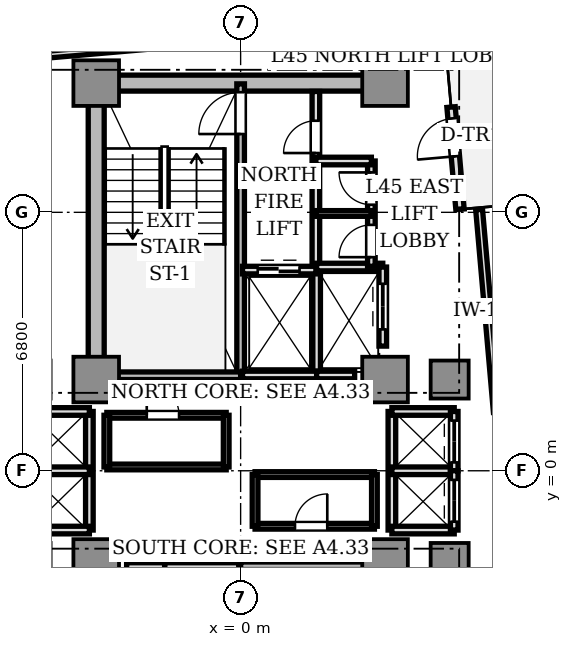
"""IFC4 building model, lengths in metres.
Left out: names, types, materials, properties, quantities, classifications, styles, units other than length and angle.
Written with IfcOpenShell. Run it as: python <this file> out.ifc"""

import sys

from ifc_helpers import new_model, si_unit, direction, frame, frame_2d, origin, origin_2d, place, context, subcontext, project, spatial, rectangle, extrude, source, transform, mapped, element, fill, save


model = new_model("IFC4")
c1 = context("Model", 3, precision=1e-05, world=origin(), true_north=direction((0.0, 1.0)))
c2 = subcontext(c1, "Body", "Model", "MODEL_VIEW")
j1 = project(units=[si_unit("LENGTHUNIT", "METRE"), si_unit("PLANEANGLEUNIT", "RADIAN")], contexts=[c1])
p1 = place(None, origin())
s1 = spatial("IfcSite", under=j1, at=p1, CompositionType="ELEMENT")
p2 = place(p1, origin())
s2 = spatial("IfcBuilding", under=s1, at=p2, CompositionType="ELEMENT")
p3 = place(p2, frame((0.0, 0.0, 164.0)))
s3 = spatial("IfcBuildingStorey", under=s2, at=p3, CompositionType="ELEMENT", Elevation=164.0)
p4 = place(p3, frame((-3.55, 10.2, 0.0), z_axis=(0.0, 0.0, 1.0), x_axis=(1.0, 0.0, 0.0)))
e1 = element("IfcWall", 1, at=p4, inside=s3, PredefinedType="SHEAR", context=c2, shape_type="SweptSolid", body=[
    extrude(rectangle(XDim=7.1, YDim=0.42, at=frame_2d((3.55, 0.0))), origin(), (0.0, 0.0, 1.0), 3.11),
])
p5 = place(p3, frame((-3.8, 2.85, 0.0), z_axis=(0.0, 0.0, 1.0), x_axis=(0.0, 1.0, 0.0)))
e2 = element("IfcWall", 2, at=p5, inside=s3, PredefinedType="SHEAR", context=c2, shape_type="SweptSolid", body=[
    extrude(rectangle(XDim=6.9, YDim=0.42, at=frame_2d((3.45, 0.0))), origin(), (0.0, 0.0, 1.0), 3.11),
])
m1 = source(origin(), c2, "Body", "SweptSolid", [
    extrude(rectangle(XDim=1.2, YDim=1.2, at=origin_2d()), origin(), (0.0, 0.0, 1.0), 3.11),
])
for number, where, z_axis, x_axis in (
    (3, (-3.8, 2.4, 0.0), (0.0, 0.0, 1.0), (1.0, 0.0, 0.0)),
    (4, (3.8, 2.4, 0.0), (0.0, 0.0, 1.0), (1.0, 0.0, 0.0)),
    (5, (-3.8, 10.2, 0.0), (0.0, 0.0, 1.0), (1.0, 0.0, 0.0)),
    (6, (3.8, 10.2, 0.0), (0.0, 0.0, 1.0), (1.0, 0.0, 0.0)),
    (7, (-3.8, -2.4, 0.0), (0.0, 0.0, 1.0), (1.0, 0.0, 0.0)),
    (8, (3.8, -2.4, 0.0), (0.0, 0.0, 1.0), (1.0, 0.0, 0.0)),
):
    element("IfcColumn", number, at=place(p3, frame(where, z_axis=z_axis, x_axis=x_axis)), inside=s3, PredefinedType="COLUMN", context=c2, shape_type="MappedRepresentation", body=[
        mapped(m1, transform((0.0, 0.0, 0.0), scale=1.0)),
    ])
m2 = source(origin(), c2, "Body", "SweptSolid", [
    extrude(rectangle(XDim=1.0, YDim=1.0, at=origin_2d()), origin(), (0.0, 0.0, 1.0), 3.11),
])
for number, where, z_axis, x_axis in (
    (9, (5.5, 2.4, 0.0), (0.0, 0.0, 1.0), (1.0, 0.0, 0.0)),
    (10, (5.5, -2.4, 0.0), (0.0, 0.0, 1.0), (1.0, 0.0, 0.0)),
):
    element("IfcColumn", number, at=place(p3, frame(where, z_axis=z_axis, x_axis=x_axis)), inside=s3, PredefinedType="COLUMN", context=c2, shape_type="MappedRepresentation", body=[
        mapped(m2, transform((0.0, 0.0, 0.0), scale=1.0)),
    ])
p6 = place(p3, frame((5.772, 6.879, 0.0), z_axis=(0.0, 0.0, 1.0), x_axis=(-0.087168071984, 0.996193619346, 0.0)))
e11 = element("IfcWall", 11, at=p6, inside=s3, PredefinedType="STANDARD", context=c2, shape_type="SweptSolid", body=[
    extrude(rectangle(XDim=2.7, YDim=0.22, at=frame_2d((1.35, 0.0))), origin(), (0.0, 0.0, 1.0), 3.11),
])
p7 = place(p6, frame((1.4, 0.0, 0.0)))
e12 = element("IfcOpeningElement", 12, at=p7, cuts=e11, PredefinedType="OPENING", context=c2, shape_type="SweptSolid", body=[
    extrude(rectangle(XDim=1.0, YDim=2.2, at=frame_2d((0.5, 1.1))), frame((0.0, 0.12, 0.0), z_axis=(0.0, -1.0, 0.0), x_axis=(1.0, 0.0, 0.0)), (0.0, 0.0, 1.0), 0.24),
])
p8 = place(p3, frame((0.0, 2.5, 0.0), z_axis=(0.0, 0.0, 1.0), x_axis=(0.0, 1.0, 0.0)))
e13 = element("IfcWall", 13, at=p8, inside=s3, PredefinedType="SOLIDWALL", context=c2, shape_type="SweptSolid", body=[
    extrude(rectangle(XDim=7.68, YDim=0.2, at=frame_2d((3.84, 0.0))), origin(), (0.0, 0.0, 1.0), 3.11),
])
p9 = place(p8, frame((6.36, 0.0, 0.0)))
e14 = element("IfcOpeningElement", 14, at=p9, cuts=e13, PredefinedType="OPENING", context=c2, shape_type="SweptSolid", body=[
    extrude(rectangle(XDim=1.1, YDim=2.15, at=frame_2d((0.55, 1.075))), frame((0.0, 0.11, 0.0), z_axis=(0.0, -1.0, 0.0), x_axis=(1.0, 0.0, 0.0)), (0.0, 0.0, 1.0), 0.22),
])
p10 = place(p3, frame((-3.72, 2.5, 0.0), z_axis=(0.0, 0.0, 1.0), x_axis=(1.0, 0.0, 0.0)))
e15 = element("IfcWall", 15, at=p10, inside=s3, PredefinedType="SOLIDWALL", context=c2, shape_type="SweptSolid", body=[
    extrude(rectangle(XDim=3.72, YDim=0.2, at=frame_2d((1.86, 0.0))), origin(), (0.0, 0.0, 1.0), 3.11),
])
p11 = place(p3, frame((0.0, -10.18, 0.0), z_axis=(0.0, 0.0, 1.0), x_axis=(0.0, 1.0, 0.0)))
e16 = element("IfcWall", 16, at=p11, inside=s3, PredefinedType="SOLIDWALL", context=c2, shape_type="SweptSolid", body=[
    extrude(rectangle(XDim=7.68, YDim=0.2, at=frame_2d((3.84, 0.0))), origin(), (0.0, 0.0, 1.0), 3.11),
])
p12 = place(p11, frame((0.28, 0.0, 0.0)))
e17 = element("IfcOpeningElement", 17, at=p12, cuts=e16, PredefinedType="OPENING", context=c2, shape_type="SweptSolid", body=[
    extrude(rectangle(XDim=1.1, YDim=2.15, at=frame_2d((0.55, 1.075))), frame((0.0, 0.11, 0.0), z_axis=(0.0, -1.0, 0.0), x_axis=(1.0, 0.0, 0.0)), (0.0, 0.0, 1.0), 0.22),
])
p13 = place(p3, frame((0.0, -2.5, 0.0), z_axis=(0.0, 0.0, 1.0), x_axis=(1.0, 0.0, 0.0)))
e18 = element("IfcWall", 18, at=p13, inside=s3, PredefinedType="SOLIDWALL", context=c2, shape_type="SweptSolid", body=[
    extrude(rectangle(XDim=3.72, YDim=0.2, at=frame_2d((1.86, 0.0))), origin(), (0.0, 0.0, 1.0), 3.11),
])
p14 = place(p3, frame((1.98, 5.32, 0.0), z_axis=(0.0, 0.0, 1.0), x_axis=(0.0, 1.0, 0.0)))
e19 = element("IfcWall", 19, at=p14, inside=s3, PredefinedType="SOLIDWALL", context=c2, shape_type="SweptSolid", body=[
    extrude(rectangle(XDim=4.66, YDim=0.2, at=frame_2d((2.33, 0.0))), origin(), (0.0, 0.0, 1.0), 2.66),
])
p15 = place(p14, frame((3.04, 0.0, 0.0)))
e20 = element("IfcOpeningElement", 20, at=p15, cuts=e19, PredefinedType="OPENING", context=c2, shape_type="SweptSolid", body=[
    extrude(rectangle(XDim=0.85, YDim=2.1, at=frame_2d((0.425, 1.05))), frame((0.0, 0.11, 0.0), z_axis=(0.0, -1.0, 0.0), x_axis=(1.0, 0.0, 0.0)), (0.0, 0.0, 1.0), 0.22),
])
p16 = place(p3, frame((2.0, 2.5, 0.0), z_axis=(0.0, 0.0, 1.0), x_axis=(0.0, 1.0, 0.0)))
e21 = element("IfcWall", 21, at=p16, inside=s3, PredefinedType="SOLIDWALL", context=c2, shape_type="SweptSolid", body=[
    extrude(rectangle(XDim=2.78, YDim=0.2, at=frame_2d((1.39, 0.0))), origin(), (0.0, 0.0, 1.0), 2.66),
])
p17 = place(p3, frame((0.05, 2.52, 0.0), z_axis=(0.0, 0.0, 1.0), x_axis=(1.0, 0.0, 0.0)))
e22 = element("IfcWall", 22, at=p17, inside=s3, PredefinedType="SOLIDWALL", context=c2, shape_type="SweptSolid", body=[
    extrude(rectangle(XDim=1.95, YDim=0.2, at=frame_2d((0.975, 0.0))), origin(), (0.0, 0.0, 1.0), 2.66),
])
p18 = place(p3, frame((0.05, 5.28, 0.0), z_axis=(0.0, 0.0, 1.0), x_axis=(1.0, 0.0, 0.0)))
e23 = element("IfcWall", 23, at=p18, inside=s3, PredefinedType="SOLIDWALL", context=c2, shape_type="SweptSolid", body=[
    extrude(rectangle(XDim=1.93, YDim=0.2, at=frame_2d((0.965, 0.0))), origin(), (0.0, 0.0, 1.0), 2.66),
])
p19 = place(p18, frame((0.4, 0.0, 0.0)))
e24 = element("IfcOpeningElement", 24, at=p19, cuts=e23, PredefinedType="OPENING", context=c2, shape_type="SweptSolid", body=[
    extrude(rectangle(XDim=1.1, YDim=2.2, at=frame_2d((0.55, 1.1))), frame((0.0, 0.11, 0.0), z_axis=(0.0, -1.0, 0.0), x_axis=(1.0, 0.0, 0.0)), (0.0, 0.0, 1.0), 0.22),
])
p20 = place(p3, frame((-2.0, -5.28, 0.0), z_axis=(0.0, 0.0, 1.0), x_axis=(0.0, 1.0, 0.0)))
e25 = element("IfcWall", 25, at=p20, inside=s3, PredefinedType="SOLIDWALL", context=c2, shape_type="SweptSolid", body=[
    extrude(rectangle(XDim=2.78, YDim=0.2, at=frame_2d((1.39, 0.0))), origin(), (0.0, 0.0, 1.0), 2.66),
])
p21 = place(p3, frame((-2.0, -2.52, 0.0), z_axis=(0.0, 0.0, 1.0), x_axis=(1.0, 0.0, 0.0)))
e26 = element("IfcWall", 26, at=p21, inside=s3, PredefinedType="SOLIDWALL", context=c2, shape_type="SweptSolid", body=[
    extrude(rectangle(XDim=1.95, YDim=0.2, at=frame_2d((0.975, 0.0))), origin(), (0.0, 0.0, 1.0), 2.66),
])
p22 = place(p3, frame((2.0, 2.52, 0.0), z_axis=(0.0, 0.0, 1.0), x_axis=(1.0, 0.0, 0.0)))
e27 = element("IfcWall", 27, at=p22, inside=s3, PredefinedType="SOLIDWALL", context=c2, shape_type="SweptSolid", body=[
    extrude(rectangle(XDim=1.0, YDim=0.2, at=frame_2d((0.5, 0.0))), origin(), (0.0, 0.0, 1.0), 2.66),
])
p23 = place(p3, frame((2.0, 5.36, 0.0), z_axis=(0.0, 0.0, 1.0), x_axis=(1.0, 0.0, 0.0)))
e28 = element("IfcWall", 28, at=p23, inside=s3, PredefinedType="SOLIDWALL", context=c2, shape_type="SweptSolid", body=[
    extrude(rectangle(XDim=1.74, YDim=0.2, at=frame_2d((0.87, 0.0))), origin(), (0.0, 0.0, 1.0), 2.66),
])
p24 = place(p3, frame((3.74, 3.28, 0.0), z_axis=(0.0, 0.0, 1.0), x_axis=(0.0, 1.0, 0.0)))
e29 = element("IfcWall", 29, at=p24, inside=s3, PredefinedType="SOLIDWALL", context=c2, shape_type="SweptSolid", body=[
    extrude(rectangle(XDim=2.08, YDim=0.2, at=frame_2d((1.04, 0.0))), origin(), (0.0, 0.0, 1.0), 2.66),
])
p25 = place(p24, frame((0.44, 0.0, 0.0)))
e30 = element("IfcOpeningElement", 30, at=p25, cuts=e29, PredefinedType="OPENING", context=c2, shape_type="SweptSolid", body=[
    extrude(rectangle(XDim=1.2, YDim=2.2, at=frame_2d((0.6, 1.1))), frame((0.0, 0.11, 0.0), z_axis=(0.0, -1.0, 0.0), x_axis=(1.0, 0.0, 0.0)), (0.0, 0.0, 1.0), 0.22),
])
p26 = place(p3, frame((-3.0, -2.52, 0.0), z_axis=(0.0, 0.0, 1.0), x_axis=(1.0, 0.0, 0.0)))
e31 = element("IfcWall", 31, at=p26, inside=s3, PredefinedType="SOLIDWALL", context=c2, shape_type="SweptSolid", body=[
    extrude(rectangle(XDim=1.0, YDim=0.2, at=frame_2d((0.5, 0.0))), origin(), (0.0, 0.0, 1.0), 2.66),
])
p27 = place(p3, frame((3.98, -1.56, 0.0), z_axis=(0.0, 0.0, 1.0), x_axis=(0.0, 1.0, 0.0)))
e32 = element("IfcWall", 32, at=p27, inside=s3, PredefinedType="SOLIDWALL", context=c2, shape_type="SweptSolid", body=[
    extrude(rectangle(XDim=3.12, YDim=0.2, at=frame_2d((1.56, 0.0))), origin(), (0.0, 0.0, 1.0), 2.28),
])
for number, where, z_axis, x_axis in (
    (33, (3.98, 1.56, 0.0), (0.0, 0.0, 1.0), (1.0, 0.0, 0.0)),
    (34, (3.98, -1.56, 0.0), (0.0, 0.0, 1.0), (1.0, 0.0, 0.0)),
    (35, (3.98, 0.0, 0.0), (0.0, 0.0, 1.0), (1.0, 0.0, 0.0)),
):
    element("IfcWall", number, at=place(p3, frame(where, z_axis=z_axis, x_axis=x_axis)), inside=s3, PredefinedType="SOLIDWALL", context=c2, shape_type="SweptSolid", body=[
        extrude(rectangle(XDim=1.64, YDim=0.2, at=frame_2d((0.82, 0.0))), origin(), (0.0, 0.0, 1.0), 2.66),
    ])
p28 = place(p3, frame((5.62, 0.0, 0.0), z_axis=(0.0, 0.0, 1.0), x_axis=(0.0, 1.0, 0.0)))
e36 = element("IfcWall", 36, at=p28, inside=s3, PredefinedType="SOLIDWALL", context=c2, shape_type="SweptSolid", body=[
    extrude(rectangle(XDim=1.56, YDim=0.2, at=frame_2d((0.78, 0.0))), origin(), (0.0, 0.0, 1.0), 2.66),
])
p29 = place(p28, frame((0.22, 0.0, 0.0)))
e37 = element("IfcOpeningElement", 37, at=p29, cuts=e36, PredefinedType="OPENING", context=c2, shape_type="SweptSolid", body=[
    extrude(rectangle(XDim=1.1, YDim=2.2, at=frame_2d((0.55, 1.1))), frame((0.0, 0.11, 0.0), z_axis=(0.0, -1.0, 0.0), x_axis=(1.0, 0.0, 0.0)), (0.0, 0.0, 1.0), 0.22),
])
p30 = place(p3, frame((5.62, -1.56, 0.0), z_axis=(0.0, 0.0, 1.0), x_axis=(0.0, 1.0, 0.0)))
e38 = element("IfcWall", 38, at=p30, inside=s3, PredefinedType="SOLIDWALL", context=c2, shape_type="SweptSolid", body=[
    extrude(rectangle(XDim=1.56, YDim=0.2, at=frame_2d((0.78, 0.0))), origin(), (0.0, 0.0, 1.0), 2.66),
])
p31 = place(p30, frame((0.22, 0.0, 0.0)))
e39 = element("IfcOpeningElement", 39, at=p31, cuts=e38, PredefinedType="OPENING", context=c2, shape_type="SweptSolid", body=[
    extrude(rectangle(XDim=1.1, YDim=2.2, at=frame_2d((0.55, 1.1))), frame((0.0, 0.11, 0.0), z_axis=(0.0, -1.0, 0.0), x_axis=(1.0, 0.0, 0.0)), (0.0, 0.0, 1.0), 0.22),
])
p32 = place(p3, frame((-3.98, -1.56, 0.0), z_axis=(0.0, 0.0, 1.0), x_axis=(0.0, 1.0, 0.0)))
e40 = element("IfcWall", 40, at=p32, inside=s3, PredefinedType="SOLIDWALL", context=c2, shape_type="SweptSolid", body=[
    extrude(rectangle(XDim=3.12, YDim=0.2, at=frame_2d((1.56, 0.0))), origin(), (0.0, 0.0, 1.0), 2.28),
])
for number, where, z_axis, x_axis in (
    (41, (-5.62, 1.56, 0.0), (0.0, 0.0, 1.0), (1.0, 0.0, 0.0)),
    (42, (-5.62, -1.56, 0.0), (0.0, 0.0, 1.0), (1.0, 0.0, 0.0)),
    (43, (-5.62, 0.0, 0.0), (0.0, 0.0, 1.0), (1.0, 0.0, 0.0)),
):
    element("IfcWall", number, at=place(p3, frame(where, z_axis=z_axis, x_axis=x_axis)), inside=s3, PredefinedType="SOLIDWALL", context=c2, shape_type="SweptSolid", body=[
        extrude(rectangle(XDim=1.64, YDim=0.2, at=frame_2d((0.82, 0.0))), origin(), (0.0, 0.0, 1.0), 2.66),
    ])
p33 = place(p3, frame((3.44, 5.38, 0.0), z_axis=(0.0, 0.0, 1.0), x_axis=(0.0, 1.0, 0.0)))
e44 = element("IfcWall", 44, at=p33, inside=s3, PredefinedType="SOLIDWALL", context=c2, shape_type="SweptSolid", body=[
    extrude(rectangle(XDim=2.77, YDim=0.2, at=frame_2d((1.385, 0.0))), origin(), (0.0, 0.0, 1.0), 2.66),
])
p34 = place(p33, frame((0.24, 0.0, 0.0)))
e45 = element("IfcOpeningElement", 45, at=p34, cuts=e44, PredefinedType="OPENING", context=c2, shape_type="SweptSolid", body=[
    extrude(rectangle(XDim=0.85, YDim=2.1, at=frame_2d((0.425, 1.05))), frame((0.0, 0.11, 0.0), z_axis=(0.0, -1.0, 0.0), x_axis=(1.0, 0.0, 0.0)), (0.0, 0.0, 1.0), 0.22),
])
p35 = place(p33, frame((1.62, 0.0, 0.0)))
e46 = element("IfcOpeningElement", 46, at=p35, cuts=e44, PredefinedType="OPENING", context=c2, shape_type="SweptSolid", body=[
    extrude(rectangle(XDim=0.85, YDim=2.1, at=frame_2d((0.425, 1.05))), frame((0.0, 0.11, 0.0), z_axis=(0.0, -1.0, 0.0), x_axis=(1.0, 0.0, 0.0)), (0.0, 0.0, 1.0), 0.22),
])
p36 = place(p3, frame((1.98, 8.15, 0.0), z_axis=(0.0, 0.0, 1.0), x_axis=(1.0, 0.0, 0.0)))
e47 = element("IfcWall", 47, at=p36, inside=s3, PredefinedType="SOLIDWALL", context=c2, shape_type="SweptSolid", body=[
    extrude(rectangle(XDim=1.46, YDim=0.2, at=frame_2d((0.73, 0.0))), origin(), (0.0, 0.0, 1.0), 2.66),
])
p37 = place(p3, frame((1.98, 6.77, 0.0), z_axis=(0.0, 0.0, 1.0), x_axis=(1.0, 0.0, 0.0)))
e48 = element("IfcWall", 48, at=p37, inside=s3, PredefinedType="PARTITIONING", context=c2, shape_type="SweptSolid", body=[
    extrude(rectangle(XDim=1.46, YDim=0.15, at=frame_2d((0.73, 0.0))), origin(), (0.0, 0.0, 1.0), 2.66),
])
p38 = place(p3, frame((-3.52, 0.1, 0.0), z_axis=(0.0, 0.0, 1.0), x_axis=(1.0, 0.0, 0.0)))
e49 = element("IfcWall", 49, at=p38, inside=s3, PredefinedType="PARTITIONING", context=c2, shape_type="SweptSolid", body=[
    extrude(rectangle(XDim=3.14, YDim=0.15, at=frame_2d((1.57, 0.0))), origin(), (0.0, 0.0, 1.0), 2.66),
])
p39 = place(p3, frame((-3.52, 1.46, 0.0), z_axis=(0.0, 0.0, 1.0), x_axis=(1.0, 0.0, 0.0)))
e50 = element("IfcWall", 50, at=p39, inside=s3, PredefinedType="PARTITIONING", context=c2, shape_type="SweptSolid", body=[
    extrude(rectangle(XDim=3.14, YDim=0.15, at=frame_2d((1.57, 0.0))), origin(), (0.0, 0.0, 1.0), 2.66),
])
p40 = place(p39, frame((1.05, 0.0, 0.0)))
e51 = element("IfcOpeningElement", 51, at=p40, cuts=e50, PredefinedType="OPENING", context=c2, shape_type="SweptSolid", body=[
    extrude(rectangle(XDim=0.85, YDim=2.1, at=frame_2d((0.425, 1.05))), frame((0.0, 0.085, 0.0), z_axis=(0.0, -1.0, 0.0), x_axis=(1.0, 0.0, 0.0)), (0.0, 0.0, 1.0), 0.17),
])
p41 = place(p3, frame((-3.52, 0.1, 0.0), z_axis=(0.0, 0.0, 1.0), x_axis=(0.0, 1.0, 0.0)))
e52 = element("IfcWall", 52, at=p41, inside=s3, PredefinedType="PARTITIONING", context=c2, shape_type="SweptSolid", body=[
    extrude(rectangle(XDim=1.36, YDim=0.15, at=frame_2d((0.68, 0.0))), origin(), (0.0, 0.0, 1.0), 2.28),
])
p42 = place(p3, frame((-0.38, 0.1, 0.0), z_axis=(0.0, 0.0, 1.0), x_axis=(0.0, 1.0, 0.0)))
e53 = element("IfcWall", 53, at=p42, inside=s3, PredefinedType="PARTITIONING", context=c2, shape_type="SweptSolid", body=[
    extrude(rectangle(XDim=1.36, YDim=0.15, at=frame_2d((0.68, 0.0))), origin(), (0.0, 0.0, 1.0), 2.66),
])
p43 = place(p3, frame((0.38, -0.1, 0.0), z_axis=(0.0, 0.0, 1.0), x_axis=(1.0, 0.0, 0.0)))
e54 = element("IfcWall", 54, at=p43, inside=s3, PredefinedType="PARTITIONING", context=c2, shape_type="SweptSolid", body=[
    extrude(rectangle(XDim=3.14, YDim=0.15, at=frame_2d((1.57, 0.0))), origin(), (0.0, 0.0, 1.0), 2.66),
])
p44 = place(p3, frame((0.38, -1.46, 0.0), z_axis=(0.0, 0.0, 1.0), x_axis=(1.0, 0.0, 0.0)))
e55 = element("IfcWall", 55, at=p44, inside=s3, PredefinedType="PARTITIONING", context=c2, shape_type="SweptSolid", body=[
    extrude(rectangle(XDim=3.14, YDim=0.15, at=frame_2d((1.57, 0.0))), origin(), (0.0, 0.0, 1.0), 2.66),
])
p45 = place(p44, frame((1.05, 0.0, 0.0)))
e56 = element("IfcOpeningElement", 56, at=p45, cuts=e55, PredefinedType="OPENING", context=c2, shape_type="SweptSolid", body=[
    extrude(rectangle(XDim=0.85, YDim=2.1, at=frame_2d((0.425, 1.05))), frame((0.0, 0.085, 0.0), z_axis=(0.0, -1.0, 0.0), x_axis=(1.0, 0.0, 0.0)), (0.0, 0.0, 1.0), 0.17),
])
p46 = place(p3, frame((0.38, -1.46, 0.0), z_axis=(0.0, 0.0, 1.0), x_axis=(0.0, 1.0, 0.0)))
e57 = element("IfcWall", 57, at=p46, inside=s3, PredefinedType="PARTITIONING", context=c2, shape_type="SweptSolid", body=[
    extrude(rectangle(XDim=1.36, YDim=0.15, at=frame_2d((0.68, 0.0))), origin(), (0.0, 0.0, 1.0), 2.66),
])
p47 = place(p3, frame((3.52, -1.46, 0.0), z_axis=(0.0, 0.0, 1.0), x_axis=(0.0, 1.0, 0.0)))
e58 = element("IfcWall", 58, at=p47, inside=s3, PredefinedType="PARTITIONING", context=c2, shape_type="SweptSolid", body=[
    extrude(rectangle(XDim=1.36, YDim=0.15, at=frame_2d((0.68, 0.0))), origin(), (0.0, 0.0, 1.0), 2.28),
])
p48 = place(p3, frame((6.741, 1.543, 0.0), z_axis=(0.0, 0.0, 1.0), x_axis=(-0.087161289348, 0.996194212812, 0.0)))
e59 = element("IfcWall", 59, at=p48, inside=s3, PredefinedType="PARTITIONING", context=c2, shape_type="SweptSolid", body=[
    extrude(rectangle(XDim=5.35, YDim=0.18, at=frame_2d((2.675, 0.0))), origin(), (0.0, 0.0, 1.0), 2.66),
])
p49 = place(p3, frame((3.095, 11.664, 0.0), z_axis=(0.0, 0.0, 1.0), x_axis=(-0.996196061386, -0.087140158824, 0.0)))
e60 = element("IfcWall", 60, at=p49, inside=s3, PredefinedType="PARTITIONING", context=c2, shape_type="SweptSolid", body=[
    extrude(rectangle(XDim=10.4, YDim=0.18, at=frame_2d((5.2, 0.0))), origin(), (0.0, 0.0, 1.0), 2.66),
])
m3 = source(origin(), c2, "Body", "SweptSolid", [
    extrude(rectangle(XDim=1.0, YDim=0.05, at=origin_2d()), origin(), (0.0, 0.0, 1.0), 2.2),
])
p50 = place(p7, frame((0.5, 0.0, 0.0)))
e61 = element("IfcDoor", 61, at=p50, inside=s3, OperationType="SINGLE_SWING_LEFT", PredefinedType="DOOR", context=c2, shape_type="MappedRepresentation", body=[
    mapped(m3, transform((0.0, 0.0, 0.0), scale=1.0)),
])
fill(e12, e61)
m4 = source(origin(), c2, "Body", "SweptSolid", [
    extrude(rectangle(XDim=1.1, YDim=0.05, at=origin_2d()), origin(), (0.0, 0.0, 1.0), 2.15),
])
p51 = place(p9, frame((0.55, 0.0, 0.0)))
e62 = element("IfcDoor", 62, at=p51, inside=s3, OperationType="SINGLE_SWING_LEFT", PredefinedType="DOOR", context=c2, shape_type="MappedRepresentation", body=[
    mapped(m4, transform((0.0, 0.0, 0.0), scale=1.0)),
])
fill(e14, e62)
m5 = source(origin(), c2, "Body", "SweptSolid", [
    extrude(rectangle(XDim=0.85, YDim=0.05, at=origin_2d()), origin(), (0.0, 0.0, 1.0), 2.1),
])
p52 = place(p15, frame((0.425, 0.0, 0.0)))
e63 = element("IfcDoor", 63, at=p52, inside=s3, OperationType="SINGLE_SWING_LEFT", PredefinedType="DOOR", context=c2, shape_type="MappedRepresentation", body=[
    mapped(m5, transform((0.0, 0.0, 0.0), scale=1.0)),
])
fill(e20, e63)
m6 = source(origin(), c2, "Body", "SweptSolid", [
    extrude(rectangle(XDim=1.1, YDim=0.05, at=origin_2d()), origin(), (0.0, 0.0, 1.0), 2.2),
])
p53 = place(p19, frame((0.55, 0.0, 0.0)))
e64 = element("IfcDoor", 64, at=p53, inside=s3, OperationType="DOUBLE_DOOR_SLIDING", PredefinedType="DOOR", context=c2, shape_type="MappedRepresentation", body=[
    mapped(m6, transform((0.0, 0.0, 0.0), scale=1.0)),
])
fill(e24, e64)
m7 = source(origin(), c2, "Body", "SweptSolid", [
    extrude(rectangle(XDim=1.2, YDim=0.05, at=origin_2d()), origin(), (0.0, 0.0, 1.0), 2.2),
])
p54 = place(p25, frame((0.6, 0.0, 0.0)))
e65 = element("IfcDoor", 65, at=p54, inside=s3, OperationType="DOUBLE_DOOR_SLIDING", PredefinedType="DOOR", context=c2, shape_type="MappedRepresentation", body=[
    mapped(m7, transform((0.0, 0.0, 0.0), scale=1.0)),
])
fill(e30, e65)
p55 = place(p29, frame((0.55, 0.0, 0.0)))
e66 = element("IfcDoor", 66, at=p55, inside=s3, OperationType="DOUBLE_DOOR_SLIDING", PredefinedType="DOOR", context=c2, shape_type="MappedRepresentation", body=[
    mapped(m6, transform((0.0, 0.0, 0.0), scale=1.0)),
])
fill(e37, e66)
p56 = place(p31, frame((0.55, 0.0, 0.0)))
e67 = element("IfcDoor", 67, at=p56, inside=s3, OperationType="DOUBLE_DOOR_SLIDING", PredefinedType="DOOR", context=c2, shape_type="MappedRepresentation", body=[
    mapped(m6, transform((0.0, 0.0, 0.0), scale=1.0)),
])
fill(e39, e67)
p57 = place(p34, frame((0.425, 0.0, 0.0)))
e68 = element("IfcDoor", 68, at=p57, inside=s3, OperationType="SINGLE_SWING_LEFT", PredefinedType="DOOR", context=c2, shape_type="MappedRepresentation", body=[
    mapped(m5, transform((0.0, 0.0, 0.0), scale=1.0)),
])
fill(e45, e68)
p58 = place(p35, frame((0.425, 0.0, 0.0)))
e69 = element("IfcDoor", 69, at=p58, inside=s3, OperationType="SINGLE_SWING_RIGHT", PredefinedType="DOOR", context=c2, shape_type="MappedRepresentation", body=[
    mapped(m5, transform((0.0, 0.0, 0.0), scale=1.0)),
])
fill(e46, e69)
p59 = place(p40, frame((0.425, 0.0, 0.0)))
e70 = element("IfcDoor", 70, at=p59, inside=s3, OperationType="SINGLE_SWING_LEFT", PredefinedType="DOOR", context=c2, shape_type="MappedRepresentation", body=[
    mapped(m5, transform((0.0, 0.0, 0.0), scale=1.0)),
])
fill(e51, e70)
p60 = place(p45, frame((0.425, 0.0, 0.0)))
e71 = element("IfcDoor", 71, at=p60, inside=s3, OperationType="SINGLE_SWING_RIGHT", PredefinedType="DOOR", context=c2, shape_type="MappedRepresentation", body=[
    mapped(m5, transform((0.0, 0.0, 0.0), scale=1.0)),
])
fill(e56, e71)
save(model, sys.argv[1])
